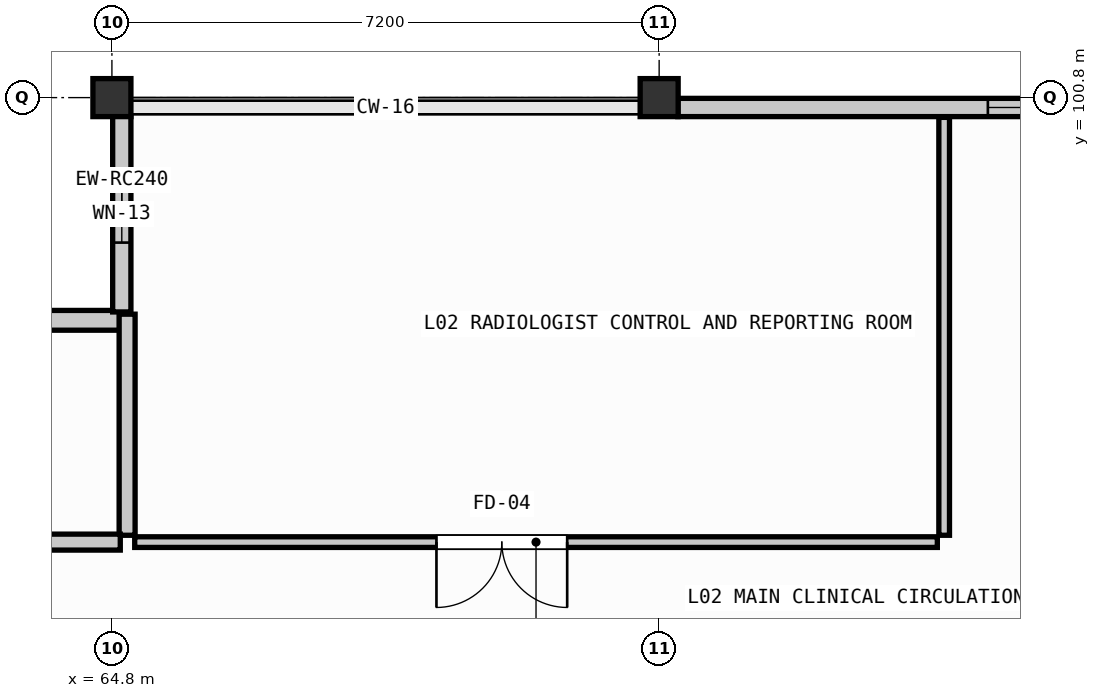
"""IFC4 building model, lengths in metres.
Left out: names, types, materials, properties, quantities, classifications, styles, units other than length and angle.
Written with IfcOpenShell. Run it as: python <this file> out.ifc"""

import sys

from ifc_helpers import new_model, si_unit, direction, frame, frame_2d, origin, origin_2d, place, context, subcontext, project, spatial, rectangle, extrude, element, fill, save


model = new_model("IFC4")
c1 = context("Model", 3, precision=1e-05, world=origin(), true_north=direction((0.0, 1.0)))
c2 = subcontext(c1, "Body", "Model", "MODEL_VIEW")
j1 = project(units=[si_unit("LENGTHUNIT", "METRE"), si_unit("PLANEANGLEUNIT", "RADIAN")], contexts=[c1])
p1 = place(None, origin())
s1 = spatial("IfcSite", under=j1, at=p1, CompositionType="ELEMENT")
p2 = place(p1, origin())
s2 = spatial("IfcBuilding", under=s1, at=p2, CompositionType="ELEMENT")
p3 = place(p2, frame((0.0, 0.0, 4.8)))
s3 = spatial("IfcBuildingStorey", under=s2, at=p3, CompositionType="ELEMENT", Elevation=4.8)
for number, where, z_axis, x_axis in (
    (1, (64.8, 100.8, 0.0), (0.0, 0.0, 1.0), (1.0, 0.0, 0.0)),
    (2, (72.0, 100.8, 0.0), (0.0, 0.0, 1.0), (1.0, 0.0, 0.0)),
):
    element("IfcColumn", number, at=place(p3, frame(where, z_axis=z_axis, x_axis=x_axis)), inside=s3, PredefinedType="COLUMN", context=c2, shape_type="SweptSolid", body=[
        extrude(rectangle(XDim=0.5, YDim=0.5, at=origin_2d()), origin(), (0.0, 0.0, 1.0), 4.2),
    ])
p4 = place(p3, frame((57.539, 97.87, 0.0), z_axis=(0.0, 0.0, 1.0), x_axis=(1.0, 0.0, 0.0)))
e3 = element("IfcWall", 3, at=p4, inside=s3, PredefinedType="SOLIDWALL", context=c2, shape_type="SweptSolid", body=[
    extrude(rectangle(XDim=7.362, YDim=0.26, at=frame_2d((3.681, 0.0))), origin(), (0.0, 0.0, 1.0), 3.5),
])
p5 = place(p4, frame((2.761, 0.0, 2.1)))
e4 = element("IfcOpeningElement", 4, at=p5, cuts=e3, PredefinedType="OPENING", context=c2, shape_type="SweptSolid", body=[
    extrude(rectangle(XDim=1.8, YDim=0.65, at=frame_2d((0.9, 0.325))), frame((0.0, 0.14, 0.0), z_axis=(0.0, -1.0, 0.0), x_axis=(1.0, 0.0, 0.0)), (0.0, 0.0, 1.0), 0.28),
])
p6 = place(p3, frame((64.93, 97.98, 0.0), z_axis=(0.0, 0.0, 1.0), x_axis=(0.0, 1.0, 0.0)))
e5 = element("IfcWall", 5, at=p6, inside=s3, PredefinedType="SOLIDWALL", context=c2, shape_type="SweptSolid", body=[
    extrude(rectangle(XDim=2.575, YDim=0.24, at=frame_2d((1.288, 0.0))), origin(), (0.0, 0.0, 1.0), 3.4),
])
p7 = place(p6, frame((0.913, 0.0, 1.5)))
e6 = element("IfcOpeningElement", 6, at=p7, cuts=e5, PredefinedType="OPENING", context=c2, shape_type="SweptSolid", body=[
    extrude(rectangle(XDim=0.75, YDim=0.95, at=frame_2d((0.375, 0.475))), frame((0.0, 0.13, 0.0), z_axis=(0.0, -1.0, 0.0), x_axis=(1.0, 0.0, 0.0)), (0.0, 0.0, 1.0), 0.26),
])
p8 = place(p3, frame((72.245, 100.67, 0.0), z_axis=(0.0, 0.0, 1.0), x_axis=(1.0, 0.0, 0.0)))
e7 = element("IfcWall", 7, at=p8, inside=s3, PredefinedType="SOLIDWALL", context=c2, shape_type="SweptSolid", body=[
    extrude(rectangle(XDim=6.71, YDim=0.24, at=frame_2d((3.355, 0.0))), origin(), (0.0, 0.0, 1.0), 3.4),
])
p9 = place(p8, frame((4.08, 0.0, 1.5)))
e8 = element("IfcOpeningElement", 8, at=p9, cuts=e7, PredefinedType="OPENING", context=c2, shape_type="SweptSolid", body=[
    extrude(rectangle(XDim=0.75, YDim=0.95, at=frame_2d((0.375, 0.475))), frame((0.0, 0.13, 0.0), z_axis=(0.0, -1.0, 0.0), x_axis=(1.0, 0.0, 0.0)), (0.0, 0.0, 1.0), 0.26),
])
p10 = place(p3, frame((65.0, 97.951, 0.0), z_axis=(0.0, 0.0, 1.0), x_axis=(0.0, -1.0, 0.0)))
e9 = element("IfcWall", 9, at=p10, inside=s3, PredefinedType="SOLIDWALL", context=c2, shape_type="SweptSolid", body=[
    extrude(rectangle(XDim=2.909, YDim=0.21, at=frame_2d((1.454, 0.0))), origin(), (0.0, 0.0, 1.0), 3.5),
])
p11 = place(p3, frame((64.91, 94.952, 0.0), z_axis=(0.0, 0.0, 1.0), x_axis=(-1.0, 0.0, 0.0)))
e10 = element("IfcWall", 10, at=p11, inside=s3, PredefinedType="SOLIDWALL", context=c2, shape_type="SweptSolid", body=[
    extrude(rectangle(XDim=17.82, YDim=0.21, at=frame_2d((8.91, 0.0))), origin(), (0.0, 0.0, 1.0), 3.5),
])
p12 = place(p11, frame((8.58, 0.0, 0.0)))
e11 = element("IfcOpeningElement", 11, at=p12, cuts=e10, PredefinedType="OPENING", context=c2, shape_type="SweptSolid", body=[
    extrude(rectangle(XDim=1.56, YDim=2.22, at=frame_2d((0.78, 1.11))), frame((0.0, 0.115, 0.0), z_axis=(0.0, -1.0, 0.0), x_axis=(1.0, 0.0, 0.0)), (0.0, 0.0, 1.0), 0.23),
])
p13 = place(p3, frame((75.66, 94.952, 0.0), z_axis=(0.0, 0.0, 1.0), x_axis=(-1.0, 0.0, 0.0)))
e12 = element("IfcWall", 12, at=p13, inside=s3, PredefinedType="PARTITIONING", context=c2, shape_type="SweptSolid", body=[
    extrude(rectangle(XDim=10.56, YDim=0.14, at=frame_2d((5.28, 0.0))), origin(), (0.0, 0.0, 1.0), 3.5),
])
p14 = place(p13, frame((4.87, 0.0, 0.0)))
e13 = element("IfcOpeningElement", 13, at=p14, cuts=e12, PredefinedType="OPENING", context=c2, shape_type="SweptSolid", body=[
    extrude(rectangle(XDim=1.72, YDim=2.26, at=frame_2d((0.86, 1.13))), frame((0.0, 0.08, 0.0), z_axis=(0.0, -1.0, 0.0), x_axis=(1.0, 0.0, 0.0)), (0.0, 0.0, 1.0), 0.16),
])
p15 = place(p3, frame((75.75, 100.54, 0.0), z_axis=(0.0, 0.0, 1.0), x_axis=(0.0, -1.0, 0.0)))
e14 = element("IfcWall", 14, at=p15, inside=s3, PredefinedType="PARTITIONING", context=c2, shape_type="SweptSolid", body=[
    extrude(rectangle(XDim=5.498, YDim=0.14, at=frame_2d((2.749, 0.0))), origin(), (0.0, 0.0, 1.0), 3.4),
])
p16 = place(p7, origin())
e15 = element("IfcWindow", 15, at=p16, inside=s3, PartitioningType="SINGLE_PANEL", PredefinedType="WINDOW", context=c2, shape_type="SweptSolid", body=[
    extrude(rectangle(XDim=0.75, YDim=0.95, at=frame_2d((0.375, 0.475))), frame((0.0, 0.03, 0.0), z_axis=(0.0, -1.0, 0.0), x_axis=(1.0, 0.0, 0.0)), (0.0, 0.0, 1.0), 0.06),
])
fill(e6, e15)
p17 = place(p9, origin())
e16 = element("IfcWindow", 16, at=p17, inside=s3, PartitioningType="SINGLE_PANEL", PredefinedType="WINDOW", context=c2, shape_type="SweptSolid", body=[
    extrude(rectangle(XDim=0.75, YDim=0.95, at=frame_2d((0.375, 0.475))), frame((0.0, 0.03, 0.0), z_axis=(0.0, -1.0, 0.0), x_axis=(1.0, 0.0, 0.0)), (0.0, 0.0, 1.0), 0.06),
])
fill(e8, e16)
p18 = place(p14, origin())
e17 = element("IfcDoor", 17, at=p18, inside=s3, OperationType="DOUBLE_DOOR_SINGLE_SWING", PredefinedType="DOOR", context=c2, shape_type="SweptSolid", body=[
    extrude(rectangle(XDim=1.72, YDim=2.26, at=frame_2d((0.86, 1.13))), frame((0.0, 0.025, 0.0), z_axis=(0.0, -1.0, 0.0), x_axis=(1.0, 0.0, 0.0)), (0.0, 0.0, 1.0), 0.05),
])
fill(e13, e17)
save(model, sys.argv[1])
